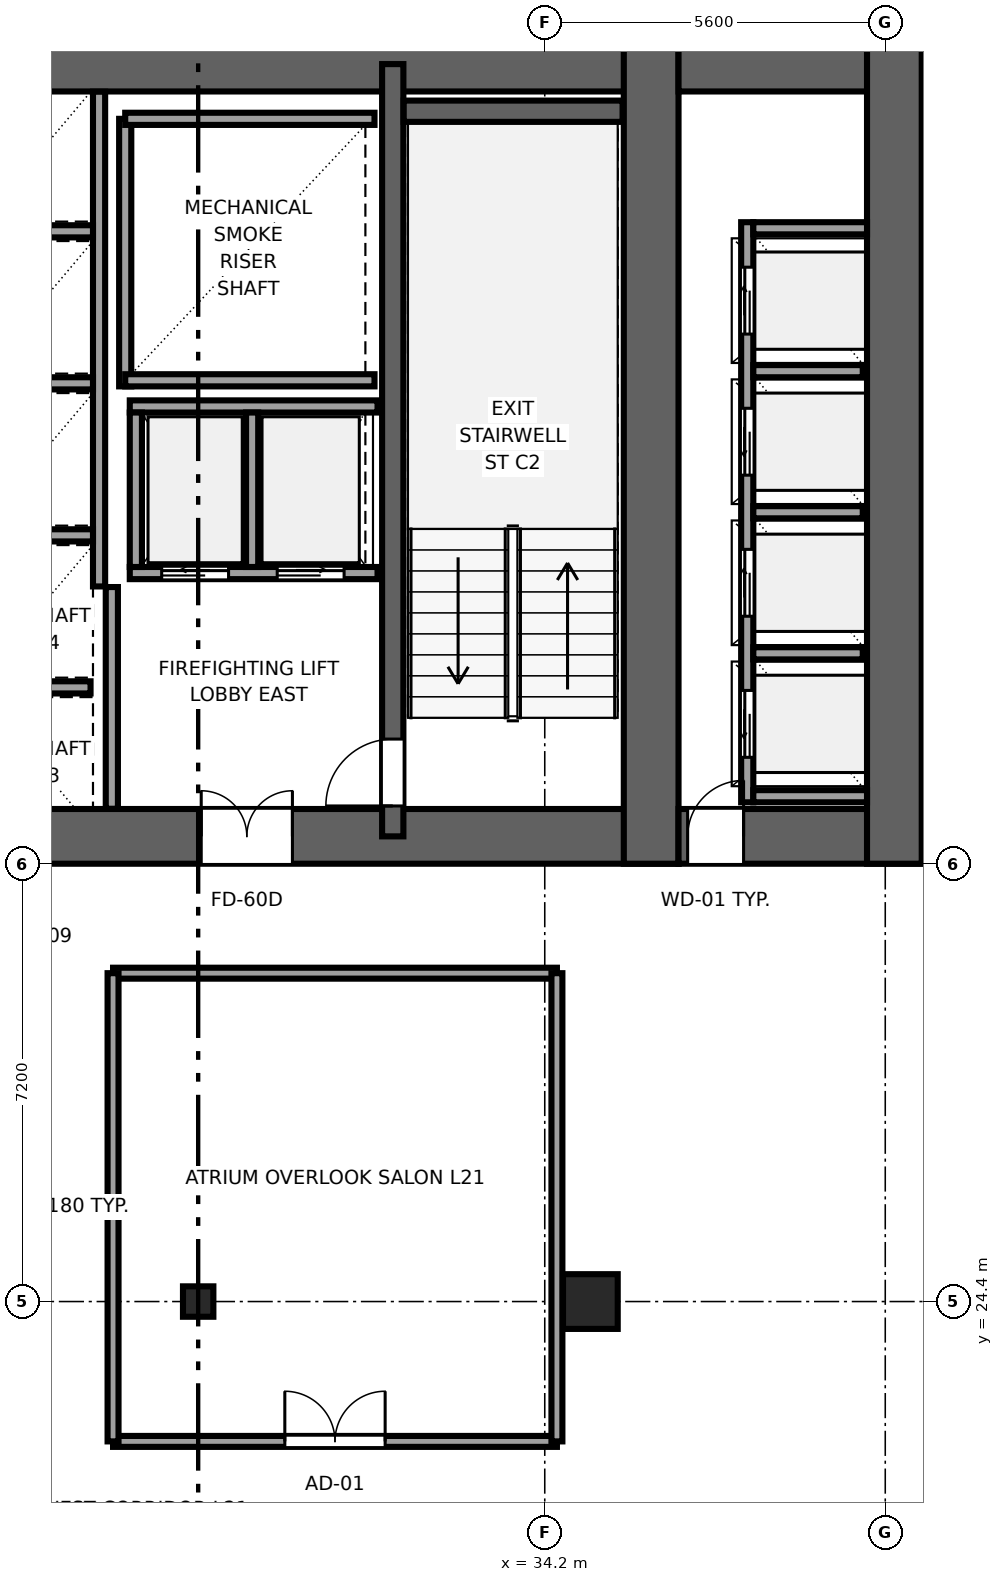
"""IFC4 building model, lengths in metres.
Left out: names, types, materials, properties, quantities, classifications, styles, units other than length and angle.
Written with IfcOpenShell. Run it as: python <this file> out.ifc"""

import sys

from ifc_helpers import new_model, si_unit, direction, frame, frame_2d, origin, origin_2d, place, context, subcontext, project, spatial, rectangle, i_section, extrude, source, transform, mapped, element, fill, save


model = new_model("IFC4")
c1 = context("Model", 3, precision=1e-05, world=origin(), true_north=direction((0.0, 1.0)))
c2 = subcontext(c1, "Body", "Model", "MODEL_VIEW")
j1 = project(units=[si_unit("LENGTHUNIT", "METRE"), si_unit("PLANEANGLEUNIT", "RADIAN")], contexts=[c1])
p1 = place(None, origin())
s1 = spatial("IfcSite", under=j1, at=p1, CompositionType="ELEMENT")
p2 = place(p1, origin())
s2 = spatial("IfcBuilding", under=s1, at=p2, CompositionType="ELEMENT")
p3 = place(p2, frame((0.0, 0.0, 85.25)))
s3 = spatial("IfcBuildingStorey", under=s2, at=p3, CompositionType="ELEMENT", Elevation=85.25)
p4 = place(p3, frame((9.6, 32.05, 0.0), z_axis=(0.0, 0.0, 1.0), x_axis=(1.0, 0.0, 0.0)))
e1 = element("IfcWall", 1, at=p4, inside=s3, PredefinedType="SHEAR", context=c2, shape_type="SweptSolid", body=[
    extrude(rectangle(XDim=26.8, YDim=0.9, at=frame_2d((13.4, 0.0))), origin(), (0.0, 0.0, 1.0), 3.55),
])
p5 = place(p4, frame((7.85, 0.0, 0.0), z_axis=(0.0, 0.0, 1.0), x_axis=(-1.0, 0.0, 0.0)))
e2 = element("IfcOpeningElement", 2, at=p5, cuts=e1, PredefinedType="OPENING", context=c2, shape_type="SweptSolid", body=[
    extrude(rectangle(XDim=1.5, YDim=2.04, at=frame_2d((0.75, 1.02))), frame((0.0, 0.46, 0.0), z_axis=(0.0, -1.0, 0.0), x_axis=(1.0, 0.0, 0.0)), (0.0, 0.0, 1.0), 0.92),
])
p6 = place(p4, frame((14.15, 0.0, 0.0), z_axis=(0.0, 0.0, 1.0), x_axis=(-1.0, 0.0, 0.0)))
e3 = element("IfcOpeningElement", 3, at=p6, cuts=e1, PredefinedType="OPENING", context=c2, shape_type="SweptSolid", body=[
    extrude(rectangle(XDim=1.5, YDim=2.04, at=frame_2d((0.75, 1.02))), frame((0.0, 0.46, 0.0), z_axis=(0.0, -1.0, 0.0), x_axis=(1.0, 0.0, 0.0)), (0.0, 0.0, 1.0), 0.92),
])
p7 = place(p4, frame((20.45, 0.0, 0.0), z_axis=(0.0, 0.0, 1.0), x_axis=(-1.0, 0.0, 0.0)))
e4 = element("IfcOpeningElement", 4, at=p7, cuts=e1, PredefinedType="OPENING", context=c2, shape_type="SweptSolid", body=[
    extrude(rectangle(XDim=1.5, YDim=2.04, at=frame_2d((0.75, 1.02))), frame((0.0, 0.46, 0.0), z_axis=(0.0, -1.0, 0.0), x_axis=(1.0, 0.0, 0.0)), (0.0, 0.0, 1.0), 0.92),
])
p8 = place(p3, frame((9.6, 44.75, 0.0), z_axis=(0.0, 0.0, 1.0), x_axis=(1.0, 0.0, 0.0)))
e5 = element("IfcWall", 5, at=p8, inside=s3, PredefinedType="SHEAR", context=c2, shape_type="SweptSolid", body=[
    extrude(rectangle(XDim=26.8, YDim=0.9, at=frame_2d((13.4, 0.0))), origin(), (0.0, 0.0, 1.0), 3.55),
])
p9 = place(p3, frame((35.95, 31.6, 0.0), z_axis=(0.0, 0.0, 1.0), x_axis=(0.0, 1.0, 0.0)))
e6 = element("IfcWall", 6, at=p9, inside=s3, PredefinedType="SHEAR", context=c2, shape_type="SweptSolid", body=[
    extrude(rectangle(XDim=13.6, YDim=0.9, at=frame_2d((6.8, 0.0))), origin(), (0.0, 0.0, 1.0), 3.55),
])
p10 = place(p3, frame((31.7, 32.05, 0.0), z_axis=(0.0, 0.0, 1.0), x_axis=(0.0, 1.0, 0.0)))
e7 = element("IfcWall", 7, at=p10, inside=s3, PredefinedType="SHEAR", context=c2, shape_type="SweptSolid", body=[
    extrude(rectangle(XDim=12.7, YDim=0.35, at=frame_2d((6.35, 0.0))), origin(), (0.0, 0.0, 1.0), 3.55),
])
p11 = place(p10, frame((1.6, 0.0, 0.0), z_axis=(0.0, 0.0, 1.0), x_axis=(-1.0, 0.0, 0.0)))
e8 = element("IfcOpeningElement", 8, at=p11, cuts=e7, PredefinedType="OPENING", context=c2, shape_type="SweptSolid", body=[
    extrude(rectangle(XDim=1.1, YDim=2.12, at=frame_2d((0.55, 1.06))), frame((0.0, 0.185, 0.0), z_axis=(0.0, -1.0, 0.0), x_axis=(1.0, 0.0, 0.0)), (0.0, 0.0, 1.0), 0.37),
])
p12 = place(p3, frame((36.4, 32.05, 0.0), z_axis=(0.0, 0.0, 1.0), x_axis=(1.0, 0.0, 0.0)))
e9 = element("IfcWall", 9, at=p12, inside=s3, PredefinedType="SHEAR", context=c2, shape_type="SweptSolid", body=[
    extrude(rectangle(XDim=4.0, YDim=0.9, at=frame_2d((2.0, 0.0))), origin(), (0.0, 0.0, 1.0), 3.55),
])
p13 = place(p12, frame((1.07, 0.0, 0.0), z_axis=(0.0, 0.0, 1.0), x_axis=(-1.0, 0.0, 0.0)))
e10 = element("IfcOpeningElement", 10, at=p13, cuts=e9, PredefinedType="OPENING", context=c2, shape_type="SweptSolid", body=[
    extrude(rectangle(XDim=0.92, YDim=2.01, at=frame_2d((0.46, 1.005))), frame((0.0, 0.46, 0.0), z_axis=(0.0, -1.0, 0.0), x_axis=(1.0, 0.0, 0.0)), (0.0, 0.0, 1.0), 0.92),
])
p14 = place(p3, frame((36.4, 44.75, 0.0), z_axis=(0.0, 0.0, 1.0), x_axis=(1.0, 0.0, 0.0)))
e11 = element("IfcWall", 11, at=p14, inside=s3, PredefinedType="SHEAR", context=c2, shape_type="SweptSolid", body=[
    extrude(rectangle(XDim=4.0, YDim=0.9, at=frame_2d((2.0, 0.0))), origin(), (0.0, 0.0, 1.0), 3.55),
])
p15 = place(p3, frame((39.95, 31.6, 0.0), z_axis=(0.0, 0.0, 1.0), x_axis=(0.0, 1.0, 0.0)))
e12 = element("IfcWall", 12, at=p15, inside=s3, PredefinedType="SHEAR", context=c2, shape_type="SweptSolid", body=[
    extrude(rectangle(XDim=13.6, YDim=0.9, at=frame_2d((6.8, 0.0))), origin(), (0.0, 0.0, 1.0), 3.55),
])
p16 = place(p3, frame((31.88, 43.975, 0.0), z_axis=(0.0, 0.0, 1.0), x_axis=(1.0, 0.0, 0.0)))
e13 = element("IfcWall", 13, at=p16, inside=s3, PredefinedType="SHEAR", context=c2, shape_type="SweptSolid", body=[
    extrude(rectangle(XDim=3.6, YDim=0.35, at=frame_2d((1.8, 0.0))), origin(), (0.0, 0.0, 1.0), 3.55),
])
m1 = source(origin(), c2, "Body", "SweptSolid", [
    extrude(rectangle(XDim=0.9, YDim=0.9, at=origin_2d()), origin(), (0.0, 0.0, 1.0), 3.55),
])
p17 = place(p3, frame((34.95, 24.4, 0.0), z_axis=(0.0, 0.0, 1.0), x_axis=(1.0, 0.0, 0.0)))
e14 = element("IfcColumn", 14, at=p17, inside=s3, PredefinedType="COLUMN", context=c2, shape_type="MappedRepresentation", body=[
    mapped(m1, transform((0.0, 0.0, 0.0), x_axis=(1.0, 0.0, 0.0), y_axis=(0.0, 1.0, 0.0), z_axis=(0.0, 0.0, 1.0), scale=1.0)),
])
m2 = source(origin(), c2, "Body", "SweptSolid", [
    extrude(i_section(OverallWidth=0.5, OverallDepth=0.5, WebThickness=0.022, FlangeThickness=0.034, at=origin_2d()), origin(), (0.0, 0.0, 1.0), 3.55),
])
p18 = place(p3, frame((28.5, 24.4, 0.0), z_axis=(0.0, 0.0, 1.0), x_axis=(1.0, 0.0, 0.0)))
e15 = element("IfcColumn", 15, at=p18, inside=s3, PredefinedType="COLUMN", context=c2, shape_type="MappedRepresentation", body=[
    mapped(m2, transform((0.0, 0.0, 0.0), x_axis=(1.0, 0.0, 0.0), y_axis=(0.0, 1.0, 0.0), z_axis=(0.0, 0.0, 1.0), scale=1.0)),
])
p19 = place(p3, frame((27.3, 39.45, 0.0), z_axis=(0.0, 0.0, 1.0), x_axis=(0.0, 1.0, 0.0)))
e16 = element("IfcWall", 16, at=p19, inside=s3, PredefinedType="SOLIDWALL", context=c2, shape_type="SweptSolid", body=[
    extrude(rectangle(XDim=4.4, YDim=0.2, at=frame_2d((2.2, 0.0))), origin(), (0.0, 0.0, 1.0), 3.37),
])
for number, where, z_axis, x_axis in (
    (17, (27.3, 39.55, 0.0), (0.0, 0.0, 1.0), (1.0, 0.0, 0.0)),
    (18, (27.3, 43.85, 0.0), (0.0, 0.0, 1.0), (1.0, 0.0, 0.0)),
):
    element("IfcWall", number, at=place(p3, frame(where, z_axis=z_axis, x_axis=x_axis)), inside=s3, PredefinedType="SOLIDWALL", context=c2, shape_type="SweptSolid", body=[
        extrude(rectangle(XDim=4.1, YDim=0.2, at=frame_2d((2.05, 0.0))), origin(), (0.0, 0.0, 1.0), 3.37),
    ])
p20 = place(p3, frame((27.08, 32.504, 0.0), z_axis=(0.0, 0.0, 1.0), x_axis=(0.0, 1.0, 0.0)))
e19 = element("IfcWall", 19, at=p20, inside=s3, PredefinedType="SOLIDWALL", context=c2, shape_type="SweptSolid", body=[
    extrude(rectangle(XDim=3.646, YDim=0.2, at=frame_2d((1.823, 0.0))), origin(), (0.0, 0.0, 1.0), 3.37),
])
p21 = place(p3, frame((27.375, 36.38, 0.0), z_axis=(0.0, 0.0, 1.0), x_axis=(1.0, 0.0, 0.0)))
e20 = element("IfcWall", 20, at=p21, inside=s3, PredefinedType="SOLIDWALL", context=c2, shape_type="SweptSolid", body=[
    extrude(rectangle(XDim=4.075, YDim=0.2, at=frame_2d((2.038, 0.0))), origin(), (0.0, 0.0, 1.0), 3.37),
])
p22 = place(p21, frame((0.525, 0.0, 0.0)))
e21 = element("IfcOpeningElement", 21, at=p22, cuts=e20, PredefinedType="OPENING", context=c2, shape_type="SweptSolid", body=[
    extrude(rectangle(XDim=1.1, YDim=2.12, at=frame_2d((0.55, 1.06))), frame((0.0, 0.11, 0.0), z_axis=(0.0, -1.0, 0.0), x_axis=(1.0, 0.0, 0.0)), (0.0, 0.0, 1.0), 0.22),
])
p23 = place(p21, frame((2.425, 0.0, 0.0)))
e22 = element("IfcOpeningElement", 22, at=p23, cuts=e20, PredefinedType="OPENING", context=c2, shape_type="SweptSolid", body=[
    extrude(rectangle(XDim=1.1, YDim=2.12, at=frame_2d((0.55, 1.06))), frame((0.0, 0.11, 0.0), z_axis=(0.0, -1.0, 0.0), x_axis=(1.0, 0.0, 0.0)), (0.0, 0.0, 1.0), 0.22),
])
p24 = place(p3, frame((27.375, 39.12, 0.0), z_axis=(0.0, 0.0, 1.0), x_axis=(1.0, 0.0, 0.0)))
e23 = element("IfcWall", 23, at=p24, inside=s3, PredefinedType="SOLIDWALL", context=c2, shape_type="SweptSolid", body=[
    extrude(rectangle(XDim=4.075, YDim=0.2, at=frame_2d((2.038, 0.0))), origin(), (0.0, 0.0, 1.0), 3.37),
])
for number, where, z_axis, x_axis in (
    (24, (27.475, 36.48, 0.0), (0.0, 0.0, 1.0), (0.0, 1.0, 0.0)),
    (25, (29.387, 36.48, 0.0), (0.0, 0.0, 1.0), (0.0, 1.0, 0.0)),
):
    element("IfcWall", number, at=place(p3, frame(where, z_axis=z_axis, x_axis=x_axis)), inside=s3, PredefinedType="SOLIDWALL", context=c2, shape_type="SweptSolid", body=[
        extrude(rectangle(XDim=2.54, YDim=0.2, at=frame_2d((1.27, 0.0))), origin(), (0.0, 0.0, 1.0), 3.37),
    ])
p25 = place(p3, frame((26.87, 36.16, 0.0), z_axis=(0.0, 0.0, 1.0), x_axis=(0.0, 1.0, 0.0)))
e26 = element("IfcWall", 26, at=p25, inside=s3, PredefinedType="SOLIDWALL", context=c2, shape_type="SweptSolid", body=[
    extrude(rectangle(XDim=8.136, YDim=0.2, at=frame_2d((4.068, 0.0))), origin(), (0.0, 0.0, 1.0), 3.37),
])
p26 = place(p3, frame((24.93, 34.5, 0.0), z_axis=(0.0, 0.0, 1.0), x_axis=(1.0, 0.0, 0.0)))
e27 = element("IfcWall", 27, at=p26, inside=s3, PredefinedType="SOLIDWALL", context=c2, shape_type="SweptSolid", body=[
    extrude(rectangle(XDim=1.8, YDim=0.2, at=frame_2d((0.9, 0.0))), origin(), (0.0, 0.0, 1.0), 3.37),
])
for number, where, z_axis, x_axis in (
    (28, (24.93, 37.0, 0.0), (0.0, 0.0, 1.0), (1.0, 0.0, 0.0)),
    (29, (24.93, 39.5, 0.0), (0.0, 0.0, 1.0), (1.0, 0.0, 0.0)),
    (30, (24.93, 42.0, 0.0), (0.0, 0.0, 1.0), (1.0, 0.0, 0.0)),
):
    element("IfcWall", number, at=place(p3, frame(where, z_axis=z_axis, x_axis=x_axis)), inside=s3, PredefinedType="SOLIDWALL", context=c2, shape_type="SweptSolid", body=[
        extrude(rectangle(XDim=1.84, YDim=0.2, at=frame_2d((0.92, 0.0))), origin(), (0.0, 0.0, 1.0), 3.37),
    ])
p27 = place(p3, frame((37.53, 32.61, 0.0), z_axis=(0.0, 0.0, 1.0), x_axis=(0.0, 1.0, 0.0)))
e31 = element("IfcWall", 31, at=p27, inside=s3, PredefinedType="SOLIDWALL", context=c2, shape_type="SweptSolid", body=[
    extrude(rectangle(XDim=9.54, YDim=0.2, at=frame_2d((4.77, 0.0))), origin(), (0.0, 0.0, 1.0), 3.37),
])
p28 = place(p27, frame((0.74, 0.0, 0.0)))
e32 = element("IfcOpeningElement", 32, at=p28, cuts=e31, PredefinedType="OPENING", context=c2, shape_type="SweptSolid", body=[
    extrude(rectangle(XDim=1.1, YDim=2.12, at=frame_2d((0.55, 1.06))), frame((0.0, 0.11, 0.0), z_axis=(0.0, -1.0, 0.0), x_axis=(1.0, 0.0, 0.0)), (0.0, 0.0, 1.0), 0.22),
])
p29 = place(p27, frame((3.06, 0.0, 0.0)))
e33 = element("IfcOpeningElement", 33, at=p29, cuts=e31, PredefinedType="OPENING", context=c2, shape_type="SweptSolid", body=[
    extrude(rectangle(XDim=1.1, YDim=2.12, at=frame_2d((0.55, 1.06))), frame((0.0, 0.11, 0.0), z_axis=(0.0, -1.0, 0.0), x_axis=(1.0, 0.0, 0.0)), (0.0, 0.0, 1.0), 0.22),
])
p30 = place(p27, frame((5.38, 0.0, 0.0)))
e34 = element("IfcOpeningElement", 34, at=p30, cuts=e31, PredefinedType="OPENING", context=c2, shape_type="SweptSolid", body=[
    extrude(rectangle(XDim=1.1, YDim=2.12, at=frame_2d((0.55, 1.06))), frame((0.0, 0.11, 0.0), z_axis=(0.0, -1.0, 0.0), x_axis=(1.0, 0.0, 0.0)), (0.0, 0.0, 1.0), 0.22),
])
p31 = place(p27, frame((7.7, 0.0, 0.0)))
e35 = element("IfcOpeningElement", 35, at=p31, cuts=e31, PredefinedType="OPENING", context=c2, shape_type="SweptSolid", body=[
    extrude(rectangle(XDim=1.1, YDim=2.12, at=frame_2d((0.55, 1.06))), frame((0.0, 0.11, 0.0), z_axis=(0.0, -1.0, 0.0), x_axis=(1.0, 0.0, 0.0)), (0.0, 0.0, 1.0), 0.22),
])
for number, where, z_axis, x_axis in (
    (36, (37.63, 32.71, 0.0), (0.0, 0.0, 1.0), (1.0, 0.0, 0.0)),
    (37, (37.63, 42.05, 0.0), (0.0, 0.0, 1.0), (1.0, 0.0, 0.0)),
):
    element("IfcWall", number, at=place(p3, frame(where, z_axis=z_axis, x_axis=x_axis)), inside=s3, PredefinedType="SOLIDWALL", context=c2, shape_type="SweptSolid", body=[
        extrude(rectangle(XDim=1.87, YDim=0.2, at=frame_2d((0.935, 0.0))), origin(), (0.0, 0.0, 1.0), 3.37),
    ])
for number, where, z_axis, x_axis in (
    (38, (37.63, 35.06, 0.0), (0.0, 0.0, 1.0), (1.0, 0.0, 0.0)),
    (39, (37.63, 37.38, 0.0), (0.0, 0.0, 1.0), (1.0, 0.0, 0.0)),
    (40, (37.63, 39.7, 0.0), (0.0, 0.0, 1.0), (1.0, 0.0, 0.0)),
):
    element("IfcWall", number, at=place(p3, frame(where, z_axis=z_axis, x_axis=x_axis)), inside=s3, PredefinedType="SOLIDWALL", context=c2, shape_type="SweptSolid", body=[
        extrude(rectangle(XDim=1.8, YDim=0.2, at=frame_2d((0.9, 0.0))), origin(), (0.0, 0.0, 1.0), 3.37),
    ])
p32 = place(p3, frame((27.1, 22.1, 0.0), z_axis=(0.0, 0.0, 1.0), x_axis=(1.0, 0.0, 0.0)))
e41 = element("IfcWall", 41, at=p32, inside=s3, PredefinedType="PARTITIONING", context=c2, shape_type="SweptSolid", body=[
    extrude(rectangle(XDim=7.3, YDim=0.18, at=frame_2d((3.65, 0.0))), origin(), (0.0, 0.0, 1.0), 3.37),
])
p33 = place(p32, frame((2.825, 0.0, 0.0)))
e42 = element("IfcOpeningElement", 42, at=p33, cuts=e41, PredefinedType="OPENING", context=c2, shape_type="SweptSolid", body=[
    extrude(rectangle(XDim=1.65, YDim=2.15, at=frame_2d((0.825, 1.075))), frame((0.0, 0.1, 0.0), z_axis=(0.0, -1.0, 0.0), x_axis=(1.0, 0.0, 0.0)), (0.0, 0.0, 1.0), 0.2),
])
p34 = place(p3, frame((27.1, 29.8, 0.0), z_axis=(0.0, 0.0, 1.0), x_axis=(1.0, 0.0, 0.0)))
e43 = element("IfcWall", 43, at=p34, inside=s3, PredefinedType="PARTITIONING", context=c2, shape_type="SweptSolid", body=[
    extrude(rectangle(XDim=7.3, YDim=0.18, at=frame_2d((3.65, 0.0))), origin(), (0.0, 0.0, 1.0), 3.37),
])
for number, where, z_axis, x_axis in (
    (44, (27.1, 22.1, 0.0), (0.0, 0.0, 1.0), (0.0, 1.0, 0.0)),
    (45, (34.4, 22.1, 0.0), (0.0, 0.0, 1.0), (0.0, 1.0, 0.0)),
):
    element("IfcWall", number, at=place(p3, frame(where, z_axis=z_axis, x_axis=x_axis)), inside=s3, PredefinedType="PARTITIONING", context=c2, shape_type="SweptSolid", body=[
        extrude(rectangle(XDim=7.7, YDim=0.18, at=frame_2d((3.85, 0.0))), origin(), (0.0, 0.0, 1.0), 3.37),
    ])
m3 = source(origin(), c2, "Body", "SweptSolid", [
    extrude(rectangle(XDim=1.1, YDim=2.12, at=frame_2d((0.55, 1.06))), frame((0.0, 0.025, 0.0), z_axis=(0.0, -1.0, 0.0), x_axis=(1.0, 0.0, 0.0)), (0.0, 0.0, 1.0), 0.05),
])
p35 = place(p11, origin())
e46 = element("IfcDoor", 46, at=p35, inside=s3, OperationType="SINGLE_SWING_LEFT", PredefinedType="DOOR", context=c2, shape_type="MappedRepresentation", body=[
    mapped(m3, transform((0.0, 0.0, 0.0), x_axis=(1.0, 0.0, 0.0), y_axis=(0.0, 1.0, 0.0), z_axis=(0.0, 0.0, 1.0), scale=1.0)),
])
fill(e8, e46)
m4 = source(origin(), c2, "Body", "SweptSolid", [
    extrude(rectangle(XDim=1.5, YDim=2.04, at=frame_2d((0.75, 1.02))), frame((0.0, 0.025, 0.0), z_axis=(0.0, -1.0, 0.0), x_axis=(1.0, 0.0, 0.0)), (0.0, 0.0, 1.0), 0.05),
])
p36 = place(p7, origin())
e47 = element("IfcDoor", 47, at=p36, inside=s3, OperationType="DOUBLE_DOOR_SINGLE_SWING", PredefinedType="DOOR", context=c2, shape_type="MappedRepresentation", body=[
    mapped(m4, transform((0.0, 0.0, 0.0), x_axis=(1.0, 0.0, 0.0), y_axis=(0.0, 1.0, 0.0), z_axis=(0.0, 0.0, 1.0), scale=1.0)),
])
fill(e4, e47)
m5 = source(origin(), c2, "Body", "SweptSolid", [
    extrude(rectangle(XDim=0.92, YDim=2.01, at=frame_2d((0.46, 1.005))), frame((0.0, 0.025, 0.0), z_axis=(0.0, -1.0, 0.0), x_axis=(1.0, 0.0, 0.0)), (0.0, 0.0, 1.0), 0.05),
])
p37 = place(p13, origin())
e48 = element("IfcDoor", 48, at=p37, inside=s3, OperationType="SINGLE_SWING_RIGHT", PredefinedType="DOOR", context=c2, shape_type="MappedRepresentation", body=[
    mapped(m5, transform((0.0, 0.0, 0.0), x_axis=(1.0, 0.0, 0.0), y_axis=(0.0, 1.0, 0.0), z_axis=(0.0, 0.0, 1.0), scale=1.0)),
])
fill(e10, e48)
m6 = source(origin(), c2, "Body", "SweptSolid", [
    extrude(rectangle(XDim=1.1, YDim=2.12, at=frame_2d((0.55, 1.06))), frame((0.0, 0.025, 0.0), z_axis=(0.0, -1.0, 0.0), x_axis=(1.0, 0.0, 0.0)), (0.0, 0.0, 1.0), 0.05),
])
p38 = place(p22, origin())
e49 = element("IfcDoor", 49, at=p38, inside=s3, OperationType="SLIDING_TO_LEFT", PredefinedType="DOOR", context=c2, shape_type="MappedRepresentation", body=[
    mapped(m6, transform((0.0, 0.0, 0.0), x_axis=(1.0, 0.0, 0.0), y_axis=(0.0, 1.0, 0.0), z_axis=(0.0, 0.0, 1.0), scale=1.0)),
])
fill(e21, e49)
p39 = place(p23, origin())
e50 = element("IfcDoor", 50, at=p39, inside=s3, OperationType="SLIDING_TO_RIGHT", PredefinedType="DOOR", context=c2, shape_type="MappedRepresentation", body=[
    mapped(m6, transform((0.0, 0.0, 0.0), x_axis=(1.0, 0.0, 0.0), y_axis=(0.0, 1.0, 0.0), z_axis=(0.0, 0.0, 1.0), scale=1.0)),
])
fill(e22, e50)
p40 = place(p28, origin())
e51 = element("IfcDoor", 51, at=p40, inside=s3, OperationType="SLIDING_TO_LEFT", PredefinedType="DOOR", context=c2, shape_type="MappedRepresentation", body=[
    mapped(m6, transform((0.0, 0.0, 0.0), x_axis=(1.0, 0.0, 0.0), y_axis=(0.0, 1.0, 0.0), z_axis=(0.0, 0.0, 1.0), scale=1.0)),
])
fill(e32, e51)
p41 = place(p29, origin())
e52 = element("IfcDoor", 52, at=p41, inside=s3, OperationType="SLIDING_TO_RIGHT", PredefinedType="DOOR", context=c2, shape_type="MappedRepresentation", body=[
    mapped(m6, transform((0.0, 0.0, 0.0), x_axis=(1.0, 0.0, 0.0), y_axis=(0.0, 1.0, 0.0), z_axis=(0.0, 0.0, 1.0), scale=1.0)),
])
fill(e33, e52)
p42 = place(p30, origin())
e53 = element("IfcDoor", 53, at=p42, inside=s3, OperationType="SLIDING_TO_LEFT", PredefinedType="DOOR", context=c2, shape_type="MappedRepresentation", body=[
    mapped(m6, transform((0.0, 0.0, 0.0), x_axis=(1.0, 0.0, 0.0), y_axis=(0.0, 1.0, 0.0), z_axis=(0.0, 0.0, 1.0), scale=1.0)),
])
fill(e34, e53)
p43 = place(p31, origin())
e54 = element("IfcDoor", 54, at=p43, inside=s3, OperationType="SLIDING_TO_RIGHT", PredefinedType="DOOR", context=c2, shape_type="MappedRepresentation", body=[
    mapped(m6, transform((0.0, 0.0, 0.0), x_axis=(1.0, 0.0, 0.0), y_axis=(0.0, 1.0, 0.0), z_axis=(0.0, 0.0, 1.0), scale=1.0)),
])
fill(e35, e54)
m7 = source(origin(), c2, "Body", "SweptSolid", [
    extrude(rectangle(XDim=1.65, YDim=2.15, at=frame_2d((0.825, 1.075))), frame((0.0, 0.025, 0.0), z_axis=(0.0, -1.0, 0.0), x_axis=(1.0, 0.0, 0.0)), (0.0, 0.0, 1.0), 0.05),
])
p44 = place(p33, origin())
e55 = element("IfcDoor", 55, at=p44, inside=s3, OperationType="DOUBLE_DOOR_SINGLE_SWING", PredefinedType="DOOR", context=c2, shape_type="MappedRepresentation", body=[
    mapped(m7, transform((0.0, 0.0, 0.0), x_axis=(1.0, 0.0, 0.0), y_axis=(0.0, 1.0, 0.0), z_axis=(0.0, 0.0, 1.0), scale=1.0)),
])
fill(e42, e55)
save(model, sys.argv[1])
